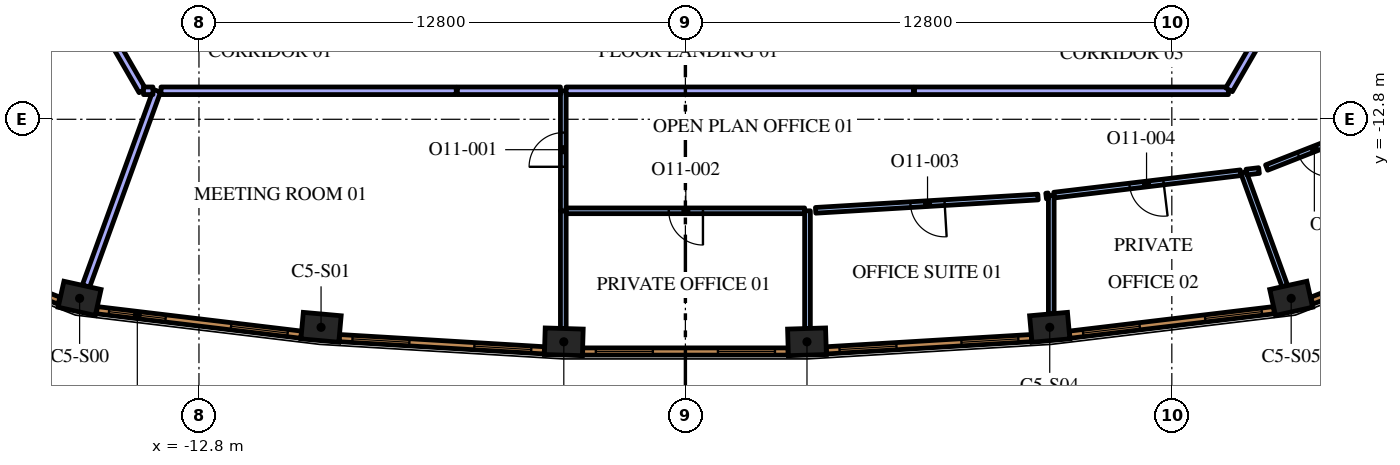
"""IFC4 building model, lengths in metres.
Left out: names, types, materials, properties, quantities, classifications, styles, units other than length and angle.
Written with IfcOpenShell. Run it as: python <this file> out.ifc"""

import sys

from ifc_helpers import new_model, si_unit, direction, frame, frame_2d, origin, origin_2d, place, context, subcontext, project, spatial, rectangle, extrude, element, fill, save


model = new_model("IFC4")
c1 = context("Model", 3, precision=1e-05, world=origin(), true_north=direction((0.0, 1.0)))
c2 = subcontext(c1, "Body", "Model", "MODEL_VIEW")
j1 = project(units=[si_unit("LENGTHUNIT", "METRE"), si_unit("PLANEANGLEUNIT", "RADIAN")], contexts=[c1])
p1 = place(None, origin())
s1 = spatial("IfcSite", under=j1, at=p1, CompositionType="ELEMENT")
p2 = place(p1, origin())
s2 = spatial("IfcBuilding", under=s1, at=p2, CompositionType="ELEMENT")
p3 = place(p2, frame((0.0, 0.0, 267.0)))
s3 = spatial("IfcBuildingStorey", under=s2, at=p3, CompositionType="ELEMENT", Elevation=267.0)
for number, where, z_axis, x_axis in (
    (1, (-15.941, -17.512, 0.0), (0.0, 0.0, 1.0), (0.976, -0.217, 0.0)),
    (2, (-9.587, -18.274, 0.0), (0.0, 0.0, 1.0), (0.996, -0.089, 0.0)),
    (3, (-3.199, -18.655, 0.0), (0.0, 0.0, 1.0), (1.0, -0.03, 0.0)),
    (4, (3.199, -18.655, 0.0), (0.0, 0.0, 1.0), (1.0, 0.03, 0.0)),
    (5, (9.587, -18.274, 0.0), (0.0, 0.0, 1.0), (0.996, 0.089, 0.0)),
    (6, (15.941, -17.512, 0.0), (0.0, 0.0, 1.0), (0.976, 0.217, 0.0)),
):
    element("IfcColumn", number, at=place(p3, frame(where, z_axis=z_axis, x_axis=x_axis)), inside=s3, PredefinedType="COLUMN", context=c2, shape_type="SweptSolid", body=[
        extrude(rectangle(XDim=1.0, YDim=0.7, at=origin_2d()), origin(), (0.0, 0.0, 1.0), 4.2),
    ])
p4 = place(p3, frame((-3.213, -15.204, 0.0), z_axis=(0.0, 0.0, 1.0), x_axis=(0.0, -1.0, 0.0)))
e7 = element("IfcWall", 7, at=p4, inside=s3, PredefinedType="PARTITIONING", context=c2, shape_type="SweptSolid", body=[
    extrude(rectangle(XDim=3.1, YDim=0.15, at=frame_2d((1.55, 0.0))), origin(), (0.0, 0.0, 1.0), 3.55),
])
p5 = place(p3, frame((-3.213, -15.212, 0.0), z_axis=(0.0, 0.0, 1.0), x_axis=(0.0, 1.0, 0.0)))
e8 = element("IfcWall", 8, at=p5, inside=s3, PredefinedType="PARTITIONING", context=c2, shape_type="SweptSolid", body=[
    extrude(rectangle(XDim=3.162, YDim=0.15, at=frame_2d((1.581, 0.0))), origin(), (0.0, 0.0, 1.0), 3.55),
])
p6 = place(p5, frame((1.162, 0.0, 0.0)))
e9 = element("IfcOpeningElement", 9, at=p6, cuts=e8, PredefinedType="OPENING", context=c2, shape_type="SweptSolid", body=[
    extrude(rectangle(XDim=0.9, YDim=2.1, at=frame_2d((0.45, 1.05))), frame((0.0, 0.085, 0.0), z_axis=(0.0, -1.0, 0.0), x_axis=(1.0, 0.0, 0.0)), (0.0, 0.0, 1.0), 0.17),
])
p7 = place(p3, frame((-15.774, -17.19, 0.0), z_axis=(0.0, 0.0, 1.0), x_axis=(0.341821907823, 0.93976474893, 0.0)))
e10 = element("IfcWall", 10, at=p7, inside=s3, PredefinedType="PARTITIONING", context=c2, shape_type="SweptSolid", body=[
    extrude(rectangle(XDim=5.469, YDim=0.2, at=frame_2d((2.735, 0.0))), origin(), (0.0, 0.0, 1.0), 3.55),
])
p8 = place(p3, frame((-6.0, -12.05, 0.0), z_axis=(0.0, 0.0, 1.0), x_axis=(1.0, 0.0, 0.0)))
e11 = element("IfcWall", 11, at=p8, inside=s3, PredefinedType="PARTITIONING", context=c2, shape_type="SweptSolid", body=[
    extrude(rectangle(XDim=2.712, YDim=0.2, at=frame_2d((1.356, 0.0))), origin(), (0.0, 0.0, 1.0), 3.55),
])
p9 = place(p3, frame((-13.799, -12.05, 0.0), z_axis=(0.0, 0.0, 1.0), x_axis=(1.0, 0.0, 0.0)))
e12 = element("IfcWall", 12, at=p9, inside=s3, PredefinedType="PARTITIONING", context=c2, shape_type="SweptSolid", body=[
    extrude(rectangle(XDim=7.769, YDim=0.2, at=frame_2d((3.884, 0.0))), origin(), (0.0, 0.0, 1.0), 3.55),
])
p10 = place(p3, frame((3.213, -15.208, 0.0), z_axis=(0.0, 0.0, 1.0), x_axis=(0.0, -1.0, 0.0)))
e13 = element("IfcWall", 13, at=p10, inside=s3, PredefinedType="PARTITIONING", context=c2, shape_type="SweptSolid", body=[
    extrude(rectangle(XDim=3.096, YDim=0.15, at=frame_2d((1.548, 0.0))), origin(), (0.0, 0.0, 1.0), 3.55),
])
p11 = place(p3, frame((3.138, -15.208, 0.0), z_axis=(0.0, 0.0, 1.0), x_axis=(-1.0, 0.0, 0.0)))
e14 = element("IfcWall", 14, at=p11, inside=s3, PredefinedType="PARTITIONING", context=c2, shape_type="SweptSolid", body=[
    extrude(rectangle(XDim=6.276, YDim=0.15, at=frame_2d((3.138, 0.0))), origin(), (0.0, 0.0, 1.0), 3.55),
])
p12 = place(p11, frame((2.676, 0.0, 0.0)))
e15 = element("IfcOpeningElement", 15, at=p12, cuts=e14, PredefinedType="OPENING", context=c2, shape_type="SweptSolid", body=[
    extrude(rectangle(XDim=0.9, YDim=2.1, at=frame_2d((0.45, 1.05))), frame((0.0, 0.085, 0.0), z_axis=(0.0, -1.0, 0.0), x_axis=(1.0, 0.0, 0.0)), (0.0, 0.0, 1.0), 0.17),
])
p13 = place(p3, frame((9.627, -14.804, 0.0), z_axis=(0.0, 0.0, 1.0), x_axis=(0.0, -1.0, 0.0)))
e16 = element("IfcWall", 16, at=p13, inside=s3, PredefinedType="PARTITIONING", context=c2, shape_type="SweptSolid", body=[
    extrude(rectangle(XDim=3.115, YDim=0.15, at=frame_2d((1.557, 0.0))), origin(), (0.0, 0.0, 1.0), 3.55),
])
p14 = place(p3, frame((9.28, -14.846, 0.0), z_axis=(0.0, 0.0, 1.0), x_axis=(-0.998220544688, -0.059630060904, 0.0)))
e17 = element("IfcWall", 17, at=p14, inside=s3, PredefinedType="PARTITIONING", context=c2, shape_type="SweptSolid", body=[
    extrude(rectangle(XDim=5.863, YDim=0.15, at=frame_2d((2.932, 0.0))), origin(), (0.0, 0.0, 1.0), 3.55),
])
p15 = place(p14, frame((2.463, 0.0, 0.0)))
e18 = element("IfcOpeningElement", 18, at=p15, cuts=e17, PredefinedType="OPENING", context=c2, shape_type="SweptSolid", body=[
    extrude(rectangle(XDim=0.9, YDim=2.1, at=frame_2d((0.45, 1.05))), frame((0.0, 0.085, 0.0), z_axis=(0.0, -1.0, 0.0), x_axis=(1.0, 0.0, 0.0)), (0.0, 0.0, 1.0), 0.17),
])
p16 = place(p3, frame((9.492, -14.82, 0.0), z_axis=(0.0, 0.0, 1.0), x_axis=(0.993123019804, 0.117075477944, 0.0)))
e19 = element("IfcWall", 19, at=p16, inside=s3, PredefinedType="PARTITIONING", context=c2, shape_type="SweptSolid", body=[
    extrude(rectangle(XDim=0.061, YDim=0.15, at=frame_2d((0.03, 0.0))), origin(), (0.0, 0.0, 1.0), 3.55),
])
p17 = place(p3, frame((14.686, -14.198, 0.0), z_axis=(0.0, 0.0, 1.0), x_axis=(0.341804623966, -0.939771035431, 0.0)))
e20 = element("IfcWall", 20, at=p17, inside=s3, PredefinedType="PARTITIONING", context=c2, shape_type="SweptSolid", body=[
    extrude(rectangle(XDim=3.184, YDim=0.15, at=frame_2d((1.592, 0.0))), origin(), (0.0, 0.0, 1.0), 3.55),
])
p18 = place(p3, frame((14.61, -14.207, 0.0), z_axis=(0.0, 0.0, 1.0), x_axis=(-0.992888520801, -0.119047827618, 0.0)))
e21 = element("IfcWall", 21, at=p18, inside=s3, PredefinedType="PARTITIONING", context=c2, shape_type="SweptSolid", body=[
    extrude(rectangle(XDim=4.942, YDim=0.15, at=frame_2d((2.471, 0.0))), origin(), (0.0, 0.0, 1.0), 3.55),
])
p19 = place(p18, frame((2.042, 0.0, 0.0)))
e22 = element("IfcOpeningElement", 22, at=p19, cuts=e21, PredefinedType="OPENING", context=c2, shape_type="SweptSolid", body=[
    extrude(rectangle(XDim=0.9, YDim=2.1, at=frame_2d((0.45, 1.05))), frame((0.0, 0.085, 0.0), z_axis=(0.0, -1.0, 0.0), x_axis=(1.0, 0.0, 0.0)), (0.0, 0.0, 1.0), 0.17),
])
p20 = place(p3, frame((14.762, -14.188, 0.0), z_axis=(0.0, 0.0, 1.0), x_axis=(0.992894100983, 0.11900127828, 0.0)))
e23 = element("IfcWall", 23, at=p20, inside=s3, PredefinedType="PARTITIONING", context=c2, shape_type="SweptSolid", body=[
    extrude(rectangle(XDim=0.334, YDim=0.15, at=frame_2d((0.167, 0.0))), origin(), (0.0, 0.0, 1.0), 3.55),
])
p21 = place(p3, frame((17.767, -13.101, 0.0), z_axis=(0.0, 0.0, 1.0), x_axis=(-0.930971361221, -0.365092213812, 0.0)))
e24 = element("IfcWall", 24, at=p21, inside=s3, PredefinedType="PARTITIONING", context=c2, shape_type="SweptSolid", body=[
    extrude(rectangle(XDim=2.657, YDim=0.15, at=frame_2d((1.328, 0.0))), origin(), (0.0, 0.0, 1.0), 3.55),
])
p22 = place(p21, frame((0.857, 0.0, 0.0)))
e25 = element("IfcOpeningElement", 25, at=p22, cuts=e24, PredefinedType="OPENING", context=c2, shape_type="SweptSolid", body=[
    extrude(rectangle(XDim=0.9, YDim=2.1, at=frame_2d((0.45, 1.05))), frame((0.0, 0.085, 0.0), z_axis=(0.0, -1.0, 0.0), x_axis=(1.0, 0.0, 0.0)), (0.0, 0.0, 1.0), 0.17),
])
p23 = place(p3, frame((-3.138, -12.05, 0.0), z_axis=(0.0, 0.0, 1.0), x_axis=(1.0, 0.0, 0.0)))
e26 = element("IfcWall", 26, at=p23, inside=s3, PredefinedType="PARTITIONING", context=c2, shape_type="SweptSolid", body=[
    extrude(rectangle(XDim=9.138, YDim=0.2, at=frame_2d((4.569, 0.0))), origin(), (0.0, 0.0, 1.0), 3.55),
])
p24 = place(p3, frame((6.03, -12.05, 0.0), z_axis=(0.0, 0.0, 1.0), x_axis=(1.0, 0.0, 0.0)))
e27 = element("IfcWall", 27, at=p24, inside=s3, PredefinedType="PARTITIONING", context=c2, shape_type="SweptSolid", body=[
    extrude(rectangle(XDim=8.259, YDim=0.2, at=frame_2d((4.13, 0.0))), origin(), (0.0, 0.0, 1.0), 3.55),
])
p25 = place(p3, frame((14.304, -12.024, 0.0), z_axis=(0.0, 0.0, 1.0), x_axis=(0.500010613097, 0.866019276224, 0.0)))
e28 = element("IfcWall", 28, at=p25, inside=s3, PredefinedType="PARTITIONING", context=c2, shape_type="SweptSolid", body=[
    extrude(rectangle(XDim=6.552, YDim=0.2, at=frame_2d((3.276, 0.0))), origin(), (0.0, 0.0, 1.0), 3.55),
])
p26 = place(p3, frame((-17.218, -6.978, 0.0), z_axis=(0.0, 0.0, 1.0), x_axis=(0.500012299885, -0.866018302326, 0.0)))
e29 = element("IfcWall", 29, at=p26, inside=s3, PredefinedType="PARTITIONING", context=c2, shape_type="SweptSolid", body=[
    extrude(rectangle(XDim=5.857, YDim=0.2, at=frame_2d((2.929, 0.0))), origin(), (0.0, 0.0, 1.0), 3.55),
])
p27 = place(p3, frame((-14.26, -12.05, 0.0), z_axis=(0.0, 0.0, 1.0), x_axis=(1.0, 0.0, 0.0)))
e30 = element("IfcWall", 30, at=p27, inside=s3, PredefinedType="PARTITIONING", context=c2, shape_type="SweptSolid", body=[
    extrude(rectangle(XDim=0.248, YDim=0.2, at=frame_2d((0.124, 0.0))), origin(), (0.0, 0.0, 1.0), 3.55),
])
p28 = place(p3, frame((-15.487, -17.823, 0.0), z_axis=(0.0, 0.0, 1.0), x_axis=(0.992885582795, -0.119072328769, 0.0)))
e31 = element("IfcWall", 31, at=p28, inside=s3, PredefinedType="SOLIDWALL", context=c2, shape_type="SweptSolid", body=[
    extrude(rectangle(XDim=5.415, YDim=0.19, at=frame_2d((2.708, 0.0))), origin(), (0.0, 0.0, 1.0), 3.95),
])
p29 = place(p28, frame((0.323, 0.0, 0.6)))
e32 = element("IfcOpeningElement", 32, at=p29, cuts=e31, PredefinedType="OPENING", context=c2, shape_type="SweptSolid", body=[
    extrude(rectangle(XDim=1.5, YDim=2.85, at=frame_2d((0.75, 1.425))), frame((0.0, 0.105, 0.0), z_axis=(0.0, -1.0, 0.0), x_axis=(1.0, 0.0, 0.0)), (0.0, 0.0, 1.0), 0.21),
])
p30 = place(p28, frame((3.558, 0.0, 0.6)))
e33 = element("IfcOpeningElement", 33, at=p30, cuts=e31, PredefinedType="OPENING", context=c2, shape_type="SweptSolid", body=[
    extrude(rectangle(XDim=1.5, YDim=2.85, at=frame_2d((0.75, 1.425))), frame((0.0, 0.105, 0.0), z_axis=(0.0, -1.0, 0.0), x_axis=(1.0, 0.0, 0.0)), (0.0, 0.0, 1.0), 0.21),
])
p31 = place(p3, frame((-9.107, -18.558, 0.0), z_axis=(0.0, 0.0, 1.0), x_axis=(0.998221492823, -0.059614186786, 0.0)))
e34 = element("IfcWall", 34, at=p31, inside=s3, PredefinedType="SOLIDWALL", context=c2, shape_type="SweptSolid", body=[
    extrude(rectangle(XDim=5.406, YDim=0.19, at=frame_2d((2.703, 0.0))), origin(), (0.0, 0.0, 1.0), 3.95),
])
p32 = place(p31, frame((0.346, 0.0, 0.6)))
e35 = element("IfcOpeningElement", 35, at=p32, cuts=e34, PredefinedType="OPENING", context=c2, shape_type="SweptSolid", body=[
    extrude(rectangle(XDim=1.5, YDim=2.85, at=frame_2d((0.75, 1.425))), frame((0.0, 0.105, 0.0), z_axis=(0.0, -1.0, 0.0), x_axis=(1.0, 0.0, 0.0)), (0.0, 0.0, 1.0), 0.21),
])
p33 = place(p31, frame((3.559, 0.0, 0.6)))
e36 = element("IfcOpeningElement", 36, at=p33, cuts=e34, PredefinedType="OPENING", context=c2, shape_type="SweptSolid", body=[
    extrude(rectangle(XDim=1.5, YDim=2.85, at=frame_2d((0.75, 1.425))), frame((0.0, 0.105, 0.0), z_axis=(0.0, -1.0, 0.0), x_axis=(1.0, 0.0, 0.0)), (0.0, 0.0, 1.0), 0.21),
])
p34 = place(p3, frame((-2.703, -18.91, 0.0), z_axis=(0.0, 0.0, 1.0), x_axis=(1.0, 0.0, 0.0)))
e37 = element("IfcWall", 37, at=p34, inside=s3, PredefinedType="SOLIDWALL", context=c2, shape_type="SweptSolid", body=[
    extrude(rectangle(XDim=5.406, YDim=0.19, at=frame_2d((2.703, 0.0))), origin(), (0.0, 0.0, 1.0), 3.95),
])
p35 = place(p34, frame((0.346, 0.0, 0.6)))
e38 = element("IfcOpeningElement", 38, at=p35, cuts=e37, PredefinedType="OPENING", context=c2, shape_type="SweptSolid", body=[
    extrude(rectangle(XDim=1.5, YDim=2.85, at=frame_2d((0.75, 1.425))), frame((0.0, 0.105, 0.0), z_axis=(0.0, -1.0, 0.0), x_axis=(1.0, 0.0, 0.0)), (0.0, 0.0, 1.0), 0.21),
])
p36 = place(p34, frame((3.56, 0.0, 0.6)))
e39 = element("IfcOpeningElement", 39, at=p36, cuts=e37, PredefinedType="OPENING", context=c2, shape_type="SweptSolid", body=[
    extrude(rectangle(XDim=1.5, YDim=2.85, at=frame_2d((0.75, 1.425))), frame((0.0, 0.105, 0.0), z_axis=(0.0, -1.0, 0.0), x_axis=(1.0, 0.0, 0.0)), (0.0, 0.0, 1.0), 0.21),
])
p37 = place(p3, frame((3.71, -18.88, 0.0), z_axis=(0.0, 0.0, 1.0), x_axis=(0.998221492823, 0.059614186786, 0.0)))
e40 = element("IfcWall", 40, at=p37, inside=s3, PredefinedType="SOLIDWALL", context=c2, shape_type="SweptSolid", body=[
    extrude(rectangle(XDim=5.406, YDim=0.19, at=frame_2d((2.703, 0.0))), origin(), (0.0, 0.0, 1.0), 3.95),
])
p38 = place(p37, frame((0.346, 0.0, 0.6)))
e41 = element("IfcOpeningElement", 41, at=p38, cuts=e40, PredefinedType="OPENING", context=c2, shape_type="SweptSolid", body=[
    extrude(rectangle(XDim=1.5, YDim=2.85, at=frame_2d((0.75, 1.425))), frame((0.0, 0.105, 0.0), z_axis=(0.0, -1.0, 0.0), x_axis=(1.0, 0.0, 0.0)), (0.0, 0.0, 1.0), 0.21),
])
p39 = place(p37, frame((3.559, 0.0, 0.6)))
e42 = element("IfcOpeningElement", 42, at=p39, cuts=e40, PredefinedType="OPENING", context=c2, shape_type="SweptSolid", body=[
    extrude(rectangle(XDim=1.5, YDim=2.85, at=frame_2d((0.75, 1.425))), frame((0.0, 0.105, 0.0), z_axis=(0.0, -1.0, 0.0), x_axis=(1.0, 0.0, 0.0)), (0.0, 0.0, 1.0), 0.21),
])
p40 = place(p3, frame((10.111, -18.468, 0.0), z_axis=(0.0, 0.0, 1.0), x_axis=(0.992885582795, 0.119072328769, 0.0)))
e43 = element("IfcWall", 43, at=p40, inside=s3, PredefinedType="SOLIDWALL", context=c2, shape_type="SweptSolid", body=[
    extrude(rectangle(XDim=5.415, YDim=0.19, at=frame_2d((2.708, 0.0))), origin(), (0.0, 0.0, 1.0), 3.95),
])
p41 = place(p40, frame((0.357, 0.0, 0.6)))
e44 = element("IfcOpeningElement", 44, at=p41, cuts=e43, PredefinedType="OPENING", context=c2, shape_type="SweptSolid", body=[
    extrude(rectangle(XDim=1.5, YDim=2.85, at=frame_2d((0.75, 1.425))), frame((0.0, 0.105, 0.0), z_axis=(0.0, -1.0, 0.0), x_axis=(1.0, 0.0, 0.0)), (0.0, 0.0, 1.0), 0.21),
])
p42 = place(p40, frame((3.593, 0.0, 0.6)))
e45 = element("IfcOpeningElement", 45, at=p42, cuts=e43, PredefinedType="OPENING", context=c2, shape_type="SweptSolid", body=[
    extrude(rectangle(XDim=1.5, YDim=2.85, at=frame_2d((0.75, 1.425))), frame((0.0, 0.105, 0.0), z_axis=(0.0, -1.0, 0.0), x_axis=(1.0, 0.0, 0.0)), (0.0, 0.0, 1.0), 0.21),
])
p43 = place(p3, frame((16.483, -17.573, 0.0), z_axis=(0.0, 0.0, 1.0), x_axis=(0.93100888477, 0.364996515709, 0.0)))
e46 = element("IfcWall", 46, at=p43, inside=s3, PredefinedType="SOLIDWALL", context=c2, shape_type="SweptSolid", body=[
    extrude(rectangle(XDim=3.237, YDim=0.19, at=frame_2d((1.618, 0.0))), origin(), (0.0, 0.0, 1.0), 3.95),
])
p44 = place(p43, frame((1.068, 0.0, 0.6)))
e47 = element("IfcOpeningElement", 47, at=p44, cuts=e46, PredefinedType="OPENING", context=c2, shape_type="SweptSolid", body=[
    extrude(rectangle(XDim=1.1, YDim=2.85, at=frame_2d((0.55, 1.425))), frame((0.0, 0.105, 0.0), z_axis=(0.0, -1.0, 0.0), x_axis=(1.0, 0.0, 0.0)), (0.0, 0.0, 1.0), 0.21),
])
p45 = place(p3, frame((-19.496, -16.392, 0.0), z_axis=(0.0, 0.0, 1.0), x_axis=(0.93100888477, -0.364996515709, 0.0)))
e48 = element("IfcWall", 48, at=p45, inside=s3, PredefinedType="SOLIDWALL", context=c2, shape_type="SweptSolid", body=[
    extrude(rectangle(XDim=3.237, YDim=0.19, at=frame_2d((1.618, 0.0))), origin(), (0.0, 0.0, 1.0), 3.95),
])
p46 = place(p45, frame((1.068, 0.0, 0.6)))
e49 = element("IfcOpeningElement", 49, at=p46, cuts=e48, PredefinedType="OPENING", context=c2, shape_type="SweptSolid", body=[
    extrude(rectangle(XDim=1.1, YDim=2.85, at=frame_2d((0.55, 1.425))), frame((0.0, 0.105, 0.0), z_axis=(0.0, -1.0, 0.0), x_axis=(1.0, 0.0, 0.0)), (0.0, 0.0, 1.0), 0.21),
])
p47 = place(p6, origin())
e50 = element("IfcDoor", 50, at=p47, inside=s3, OperationType="SINGLE_SWING_RIGHT", PredefinedType="DOOR", context=c2, shape_type="SweptSolid", body=[
    extrude(rectangle(XDim=0.9, YDim=2.1, at=frame_2d((0.45, 1.05))), frame((0.0, 0.025, 0.0), z_axis=(0.0, -1.0, 0.0), x_axis=(1.0, 0.0, 0.0)), (0.0, 0.0, 1.0), 0.05),
])
fill(e9, e50)
p48 = place(p12, origin())
e51 = element("IfcDoor", 51, at=p48, inside=s3, OperationType="SINGLE_SWING_LEFT", PredefinedType="DOOR", context=c2, shape_type="SweptSolid", body=[
    extrude(rectangle(XDim=0.9, YDim=2.1, at=frame_2d((0.45, 1.05))), frame((0.0, 0.025, 0.0), z_axis=(0.0, -1.0, 0.0), x_axis=(1.0, 0.0, 0.0)), (0.0, 0.0, 1.0), 0.05),
])
fill(e15, e51)
p49 = place(p15, origin())
e52 = element("IfcDoor", 52, at=p49, inside=s3, OperationType="SINGLE_SWING_LEFT", PredefinedType="DOOR", context=c2, shape_type="SweptSolid", body=[
    extrude(rectangle(XDim=0.9, YDim=2.1, at=frame_2d((0.45, 1.05))), frame((0.0, 0.025, 0.0), z_axis=(0.0, -1.0, 0.0), x_axis=(1.0, 0.0, 0.0)), (0.0, 0.0, 1.0), 0.05),
])
fill(e18, e52)
p50 = place(p19, origin())
e53 = element("IfcDoor", 53, at=p50, inside=s3, OperationType="SINGLE_SWING_RIGHT", PredefinedType="DOOR", context=c2, shape_type="SweptSolid", body=[
    extrude(rectangle(XDim=0.9, YDim=2.1, at=frame_2d((0.45, 1.05))), frame((0.0, 0.025, 0.0), z_axis=(0.0, -1.0, 0.0), x_axis=(1.0, 0.0, 0.0)), (0.0, 0.0, 1.0), 0.05),
])
fill(e22, e53)
p51 = place(p22, origin())
e54 = element("IfcDoor", 54, at=p51, inside=s3, OperationType="SINGLE_SWING_LEFT", PredefinedType="DOOR", context=c2, shape_type="SweptSolid", body=[
    extrude(rectangle(XDim=0.9, YDim=2.1, at=frame_2d((0.45, 1.05))), frame((0.0, 0.025, 0.0), z_axis=(0.0, -1.0, 0.0), x_axis=(1.0, 0.0, 0.0)), (0.0, 0.0, 1.0), 0.05),
])
fill(e25, e54)
p52 = place(p29, origin())
e55 = element("IfcWindow", 55, at=p52, inside=s3, PartitioningType="SINGLE_PANEL", PredefinedType="WINDOW", context=c2, shape_type="SweptSolid", body=[
    extrude(rectangle(XDim=1.5, YDim=2.85, at=frame_2d((0.75, 1.425))), frame((0.0, 0.045, 0.0), z_axis=(0.0, -1.0, 0.0), x_axis=(1.0, 0.0, 0.0)), (0.0, 0.0, 1.0), 0.06),
])
fill(e32, e55)
p53 = place(p30, origin())
e56 = element("IfcWindow", 56, at=p53, inside=s3, PartitioningType="SINGLE_PANEL", PredefinedType="WINDOW", context=c2, shape_type="SweptSolid", body=[
    extrude(rectangle(XDim=1.5, YDim=2.85, at=frame_2d((0.75, 1.425))), frame((0.0, 0.045, 0.0), z_axis=(0.0, -1.0, 0.0), x_axis=(1.0, 0.0, 0.0)), (0.0, 0.0, 1.0), 0.06),
])
fill(e33, e56)
p54 = place(p32, origin())
e57 = element("IfcWindow", 57, at=p54, inside=s3, PartitioningType="SINGLE_PANEL", PredefinedType="WINDOW", context=c2, shape_type="SweptSolid", body=[
    extrude(rectangle(XDim=1.5, YDim=2.85, at=frame_2d((0.75, 1.425))), frame((0.0, 0.045, 0.0), z_axis=(0.0, -1.0, 0.0), x_axis=(1.0, 0.0, 0.0)), (0.0, 0.0, 1.0), 0.06),
])
fill(e35, e57)
p55 = place(p33, origin())
e58 = element("IfcWindow", 58, at=p55, inside=s3, PartitioningType="SINGLE_PANEL", PredefinedType="WINDOW", context=c2, shape_type="SweptSolid", body=[
    extrude(rectangle(XDim=1.5, YDim=2.85, at=frame_2d((0.75, 1.425))), frame((0.0, 0.045, 0.0), z_axis=(0.0, -1.0, 0.0), x_axis=(1.0, 0.0, 0.0)), (0.0, 0.0, 1.0), 0.06),
])
fill(e36, e58)
p56 = place(p35, origin())
e59 = element("IfcWindow", 59, at=p56, inside=s3, PartitioningType="SINGLE_PANEL", PredefinedType="WINDOW", context=c2, shape_type="SweptSolid", body=[
    extrude(rectangle(XDim=1.5, YDim=2.85, at=frame_2d((0.75, 1.425))), frame((0.0, 0.045, 0.0), z_axis=(0.0, -1.0, 0.0), x_axis=(1.0, 0.0, 0.0)), (0.0, 0.0, 1.0), 0.06),
])
fill(e38, e59)
p57 = place(p36, origin())
e60 = element("IfcWindow", 60, at=p57, inside=s3, PartitioningType="SINGLE_PANEL", PredefinedType="WINDOW", context=c2, shape_type="SweptSolid", body=[
    extrude(rectangle(XDim=1.5, YDim=2.85, at=frame_2d((0.75, 1.425))), frame((0.0, 0.045, 0.0), z_axis=(0.0, -1.0, 0.0), x_axis=(1.0, 0.0, 0.0)), (0.0, 0.0, 1.0), 0.06),
])
fill(e39, e60)
p58 = place(p38, origin())
e61 = element("IfcWindow", 61, at=p58, inside=s3, PartitioningType="SINGLE_PANEL", PredefinedType="WINDOW", context=c2, shape_type="SweptSolid", body=[
    extrude(rectangle(XDim=1.5, YDim=2.85, at=frame_2d((0.75, 1.425))), frame((0.0, 0.045, 0.0), z_axis=(0.0, -1.0, 0.0), x_axis=(1.0, 0.0, 0.0)), (0.0, 0.0, 1.0), 0.06),
])
fill(e41, e61)
p59 = place(p39, origin())
e62 = element("IfcWindow", 62, at=p59, inside=s3, PartitioningType="SINGLE_PANEL", PredefinedType="WINDOW", context=c2, shape_type="SweptSolid", body=[
    extrude(rectangle(XDim=1.5, YDim=2.85, at=frame_2d((0.75, 1.425))), frame((0.0, 0.045, 0.0), z_axis=(0.0, -1.0, 0.0), x_axis=(1.0, 0.0, 0.0)), (0.0, 0.0, 1.0), 0.06),
])
fill(e42, e62)
p60 = place(p41, origin())
e63 = element("IfcWindow", 63, at=p60, inside=s3, PartitioningType="SINGLE_PANEL", PredefinedType="WINDOW", context=c2, shape_type="SweptSolid", body=[
    extrude(rectangle(XDim=1.5, YDim=2.85, at=frame_2d((0.75, 1.425))), frame((0.0, 0.045, 0.0), z_axis=(0.0, -1.0, 0.0), x_axis=(1.0, 0.0, 0.0)), (0.0, 0.0, 1.0), 0.06),
])
fill(e44, e63)
p61 = place(p42, origin())
e64 = element("IfcWindow", 64, at=p61, inside=s3, PartitioningType="SINGLE_PANEL", PredefinedType="WINDOW", context=c2, shape_type="SweptSolid", body=[
    extrude(rectangle(XDim=1.5, YDim=2.85, at=frame_2d((0.75, 1.425))), frame((0.0, 0.045, 0.0), z_axis=(0.0, -1.0, 0.0), x_axis=(1.0, 0.0, 0.0)), (0.0, 0.0, 1.0), 0.06),
])
fill(e45, e64)
save(model, sys.argv[1])
